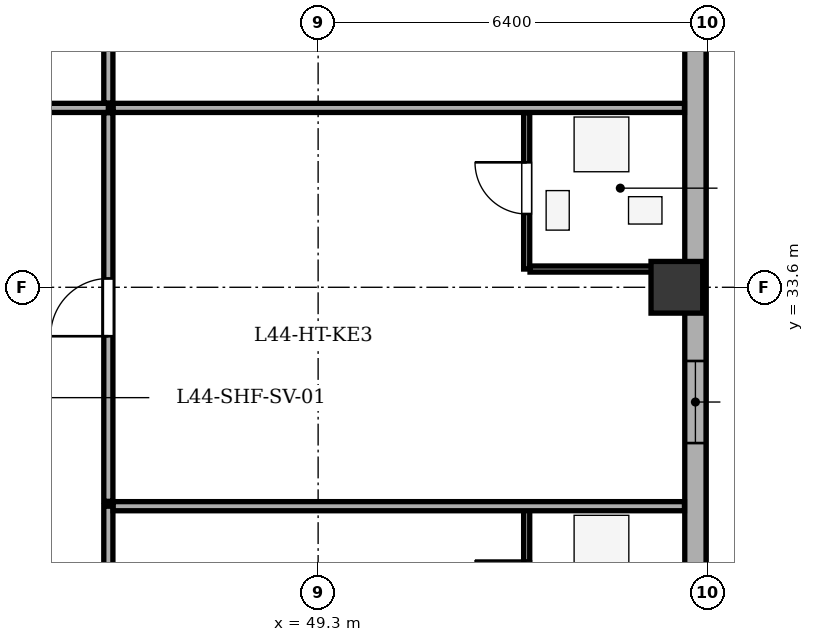
"""IFC4 building model, lengths in metres.
Left out: names, types, materials, properties, quantities, classifications, styles, units other than length and angle.
Written with IfcOpenShell. Run it as: python <this file> out.ifc"""

import sys

from ifc_helpers import new_model, si_unit, direction, frame, frame_2d, origin, origin_2d, place, context, subcontext, project, spatial, rectangle, extrude, element, fill, save


model = new_model("IFC4")
c1 = context("Model", 3, precision=1e-05, world=origin(), true_north=direction((0.0, 1.0)))
c2 = subcontext(c1, "Body", "Model", "MODEL_VIEW")
j1 = project(units=[si_unit("LENGTHUNIT", "METRE"), si_unit("PLANEANGLEUNIT", "RADIAN")], contexts=[c1])
p1 = place(None, origin())
s1 = spatial("IfcSite", under=j1, at=p1, CompositionType="ELEMENT")
p2 = place(p1, origin())
s2 = spatial("IfcBuilding", under=s1, at=p2, CompositionType="ELEMENT")
p3 = place(p2, frame((0.0, 0.0, 172.8)))
s3 = spatial("IfcBuildingStorey", under=s2, at=p3, CompositionType="ELEMENT", Elevation=172.8)
p4 = place(p3, frame((55.2, 33.6, 0.0), z_axis=(0.0, 0.0, 1.0), x_axis=(1.0, 0.0, 0.0)))
e1 = element("IfcColumn", 1, at=p4, inside=s3, PredefinedType="COLUMN", context=c2, shape_type="SweptSolid", body=[
    extrude(rectangle(XDim=0.85, YDim=0.85, at=origin_2d()), origin(), (0.0, 0.0, 1.0), 3.5),
])
p5 = place(p3, frame((55.505, 47.9, 0.0), z_axis=(0.0, 0.0, 1.0), x_axis=(0.0, -1.0, 0.0)))
e2 = element("IfcWall", 2, at=p5, inside=s3, PredefinedType="STANDARD", context=c2, shape_type="SweptSolid", body=[
    extrude(rectangle(XDim=35.0, YDim=0.35, at=frame_2d((17.5, 0.0))), origin(), (0.0, 0.0, 1.0), 2.785),
])
p6 = place(p5, frame((2.595, 0.0, 0.75)))
e3 = element("IfcOpeningElement", 3, at=p6, cuts=e2, PredefinedType="OPENING", context=c2, shape_type="SweptSolid", body=[
    extrude(rectangle(XDim=1.6, YDim=1.75, at=frame_2d((0.8, 0.875))), frame((0.0, 0.185, 0.0), z_axis=(0.0, -1.0, 0.0), x_axis=(1.0, 0.0, 0.0)), (0.0, 0.0, 1.0), 0.37),
])
p7 = place(p5, frame((7.181, 0.0, 0.75)))
e4 = element("IfcOpeningElement", 4, at=p7, cuts=e2, PredefinedType="OPENING", context=c2, shape_type="SweptSolid", body=[
    extrude(rectangle(XDim=2.1, YDim=1.75, at=frame_2d((1.05, 0.875))), frame((0.0, 0.185, 0.0), z_axis=(0.0, -1.0, 0.0), x_axis=(1.0, 0.0, 0.0)), (0.0, 0.0, 1.0), 0.37),
])
p8 = place(p5, frame((15.512, 0.0, 0.75)))
e5 = element("IfcOpeningElement", 5, at=p8, cuts=e2, PredefinedType="OPENING", context=c2, shape_type="SweptSolid", body=[
    extrude(rectangle(XDim=1.35, YDim=1.75, at=frame_2d((0.675, 0.875))), frame((0.0, 0.185, 0.0), z_axis=(0.0, -1.0, 0.0), x_axis=(1.0, 0.0, 0.0)), (0.0, 0.0, 1.0), 0.37),
])
p9 = place(p5, frame((21.45, 0.0, 0.75)))
e6 = element("IfcOpeningElement", 6, at=p9, cuts=e2, PredefinedType="OPENING", context=c2, shape_type="SweptSolid", body=[
    extrude(rectangle(XDim=1.35, YDim=1.75, at=frame_2d((0.675, 0.875))), frame((0.0, 0.185, 0.0), z_axis=(0.0, -1.0, 0.0), x_axis=(1.0, 0.0, 0.0)), (0.0, 0.0, 1.0), 0.37),
])
p10 = place(p5, frame((31.588, 0.0, 0.75)))
e7 = element("IfcOpeningElement", 7, at=p10, cuts=e2, PredefinedType="OPENING", context=c2, shape_type="SweptSolid", body=[
    extrude(rectangle(XDim=1.6, YDim=1.75, at=frame_2d((0.8, 0.875))), frame((0.0, 0.185, 0.0), z_axis=(0.0, -1.0, 0.0), x_axis=(1.0, 0.0, 0.0)), (0.0, 0.0, 1.0), 0.37),
])
p11 = place(p5, frame((28.312, 0.0, 0.75)))
e8 = element("IfcOpeningElement", 8, at=p11, cuts=e2, PredefinedType="OPENING", context=c2, shape_type="SweptSolid", body=[
    extrude(rectangle(XDim=0.75, YDim=1.45, at=frame_2d((0.375, 0.725))), frame((0.0, 0.185, 0.0), z_axis=(0.0, -1.0, 0.0), x_axis=(1.0, 0.0, 0.0)), (0.0, 0.0, 1.0), 0.37),
])
p12 = place(p3, frame((40.351, 36.55, 0.0), z_axis=(0.0, 0.0, 1.0), x_axis=(1.0, 0.0, 0.0)))
e9 = element("IfcWall", 9, at=p12, inside=s3, PredefinedType="PARTITIONING", context=c2, shape_type="SweptSolid", body=[
    extrude(rectangle(XDim=5.5, YDim=0.15, at=frame_2d((2.75, 0.0))), origin(), (0.0, 0.0, 1.0), 3.2),
])
p13 = place(p12, frame((2.27, 0.0, 0.0)))
e10 = element("IfcOpeningElement", 10, at=p13, cuts=e9, PredefinedType="OPENING", context=c2, shape_type="SweptSolid", body=[
    extrude(rectangle(XDim=0.95, YDim=2.1, at=frame_2d((0.475, 1.05))), frame((0.0, 0.085, 0.0), z_axis=(0.0, -1.0, 0.0), x_axis=(1.0, 0.0, 0.0)), (0.0, 0.0, 1.0), 0.17),
])
p14 = place(p3, frame((45.85, 36.63, 0.0), z_axis=(0.0, 0.0, 1.0), x_axis=(0.0, 1.0, 0.0)))
e11 = element("IfcWall", 11, at=p14, inside=s3, PredefinedType="PARTITIONING", context=c2, shape_type="SweptSolid", body=[
    extrude(rectangle(XDim=15.895, YDim=0.15, at=frame_2d((7.948, 0.0))), origin(), (0.0, 0.0, 1.0), 3.2),
])
p15 = place(p3, frame((45.93, 36.55, 0.0), z_axis=(0.0, 0.0, 1.0), x_axis=(1.0, 0.0, 0.0)))
e12 = element("IfcWall", 12, at=p15, inside=s3, PredefinedType="PARTITIONING", context=c2, shape_type="SweptSolid", body=[
    extrude(rectangle(XDim=9.395, YDim=0.15, at=frame_2d((4.698, 0.0))), origin(), (0.0, 0.0, 1.0), 3.2),
])
p16 = place(p3, frame((45.85, 24.28, 0.0), z_axis=(0.0, 0.0, 1.0), x_axis=(0.0, 1.0, 0.0)))
e13 = element("IfcWall", 13, at=p16, inside=s3, PredefinedType="PARTITIONING", context=c2, shape_type="SweptSolid", body=[
    extrude(rectangle(XDim=5.72, YDim=0.15, at=frame_2d((2.86, 0.0))), origin(), (0.0, 0.0, 1.0), 3.2),
])
p17 = place(p16, frame((2.34, 0.0, 0.0)))
e14 = element("IfcOpeningElement", 14, at=p17, cuts=e13, PredefinedType="OPENING", context=c2, shape_type="SweptSolid", body=[
    extrude(rectangle(XDim=0.95, YDim=2.1, at=frame_2d((0.475, 1.05))), frame((0.0, 0.085, 0.0), z_axis=(0.0, -1.0, 0.0), x_axis=(1.0, 0.0, 0.0)), (0.0, 0.0, 1.0), 0.17),
])
p18 = place(p3, frame((52.73, 27.35, 0.0), z_axis=(0.0, 0.0, 1.0), x_axis=(0.0, 1.0, 0.0)))
e15 = element("IfcWall", 15, at=p18, inside=s3, PredefinedType="PARTITIONING", context=c2, shape_type="SweptSolid", body=[
    extrude(rectangle(XDim=2.65, YDim=0.1, at=frame_2d((1.325, 0.0))), origin(), (0.0, 0.0, 1.0), 3.2),
])
p19 = place(p18, frame((0.905, 0.0, 0.0)))
e16 = element("IfcOpeningElement", 16, at=p19, cuts=e15, PredefinedType="OPENING", context=c2, shape_type="SweptSolid", body=[
    extrude(rectangle(XDim=0.85, YDim=2.05, at=frame_2d((0.425, 1.025))), frame((0.0, 0.06, 0.0), z_axis=(0.0, -1.0, 0.0), x_axis=(1.0, 0.0, 0.0)), (0.0, 0.0, 1.0), 0.12),
])
p20 = place(p3, frame((45.93, 30.0, 0.0), z_axis=(0.0, 0.0, 1.0), x_axis=(1.0, 0.0, 0.0)))
e17 = element("IfcWall", 17, at=p20, inside=s3, PredefinedType="PARTITIONING", context=c2, shape_type="SweptSolid", body=[
    extrude(rectangle(XDim=9.395, YDim=0.15, at=frame_2d((4.698, 0.0))), origin(), (0.0, 0.0, 1.0), 3.2),
])
p21 = place(p3, frame((45.85, 30.08, 0.0), z_axis=(0.0, 0.0, 1.0), x_axis=(0.0, 1.0, 0.0)))
e18 = element("IfcWall", 18, at=p21, inside=s3, PredefinedType="PARTITIONING", context=c2, shape_type="SweptSolid", body=[
    extrude(rectangle(XDim=6.39, YDim=0.15, at=frame_2d((3.195, 0.0))), origin(), (0.0, 0.0, 1.0), 3.2),
])
p22 = place(p21, frame((2.715, 0.0, 0.0)))
e19 = element("IfcOpeningElement", 19, at=p22, cuts=e18, PredefinedType="OPENING", context=c2, shape_type="SweptSolid", body=[
    extrude(rectangle(XDim=0.95, YDim=2.1, at=frame_2d((0.475, 1.05))), frame((0.0, 0.085, 0.0), z_axis=(0.0, -1.0, 0.0), x_axis=(1.0, 0.0, 0.0)), (0.0, 0.0, 1.0), 0.17),
])
p23 = place(p3, frame((52.73, 33.9, 0.0), z_axis=(0.0, 0.0, 1.0), x_axis=(0.0, 1.0, 0.0)))
e20 = element("IfcWall", 20, at=p23, inside=s3, PredefinedType="PARTITIONING", context=c2, shape_type="SweptSolid", body=[
    extrude(rectangle(XDim=2.57, YDim=0.1, at=frame_2d((1.285, 0.0))), origin(), (0.0, 0.0, 1.0), 3.2),
])
p24 = place(p23, frame((0.905, 0.0, 0.0)))
e21 = element("IfcOpeningElement", 21, at=p24, cuts=e20, PredefinedType="OPENING", context=c2, shape_type="SweptSolid", body=[
    extrude(rectangle(XDim=0.85, YDim=2.05, at=frame_2d((0.425, 1.025))), frame((0.0, 0.06, 0.0), z_axis=(0.0, -1.0, 0.0), x_axis=(1.0, 0.0, 0.0)), (0.0, 0.0, 1.0), 0.12),
])
p25 = place(p3, frame((52.785, 33.9, 0.0), z_axis=(0.0, 0.0, 1.0), x_axis=(1.0, 0.0, 0.0)))
e22 = element("IfcWall", 22, at=p25, inside=s3, PredefinedType="PARTITIONING", context=c2, shape_type="SweptSolid", body=[
    extrude(rectangle(XDim=2.54, YDim=0.1, at=frame_2d((1.27, 0.0))), origin(), (0.0, 0.0, 1.0), 2.535),
])
p26 = place(p8, origin())
e23 = element("IfcWindow", 23, at=p26, inside=s3, PartitioningType="SINGLE_PANEL", PredefinedType="WINDOW", context=c2, shape_type="SweptSolid", body=[
    extrude(rectangle(XDim=1.35, YDim=1.75, at=frame_2d((0.675, 0.875))), frame((0.0, -0.01, 0.0), z_axis=(0.0, -1.0, 0.0), x_axis=(1.0, 0.0, 0.0)), (0.0, 0.0, 1.0), 0.06),
])
fill(e5, e23)
p27 = place(p19, origin())
e24 = element("IfcDoor", 24, at=p27, inside=s3, OperationType="SINGLE_SWING_RIGHT", PredefinedType="DOOR", context=c2, shape_type="SweptSolid", body=[
    extrude(rectangle(XDim=0.85, YDim=2.05, at=frame_2d((0.425, 1.025))), frame((0.0, 0.025, 0.0), z_axis=(0.0, -1.0, 0.0), x_axis=(1.0, 0.0, 0.0)), (0.0, 0.0, 1.0), 0.05),
])
fill(e16, e24)
p28 = place(p24, origin())
e25 = element("IfcDoor", 25, at=p28, inside=s3, OperationType="SINGLE_SWING_RIGHT", PredefinedType="DOOR", context=c2, shape_type="SweptSolid", body=[
    extrude(rectangle(XDim=0.85, YDim=2.05, at=frame_2d((0.425, 1.025))), frame((0.0, 0.025, 0.0), z_axis=(0.0, -1.0, 0.0), x_axis=(1.0, 0.0, 0.0)), (0.0, 0.0, 1.0), 0.05),
])
fill(e21, e25)
p29 = place(p22, origin())
e26 = element("IfcDoor", 26, at=p29, inside=s3, OperationType="SINGLE_SWING_LEFT", PredefinedType="DOOR", context=c2, shape_type="SweptSolid", body=[
    extrude(rectangle(XDim=0.95, YDim=2.1, at=frame_2d((0.475, 1.05))), frame((0.0, 0.025, 0.0), z_axis=(0.0, -1.0, 0.0), x_axis=(1.0, 0.0, 0.0)), (0.0, 0.0, 1.0), 0.05),
])
fill(e19, e26)
save(model, sys.argv[1])
